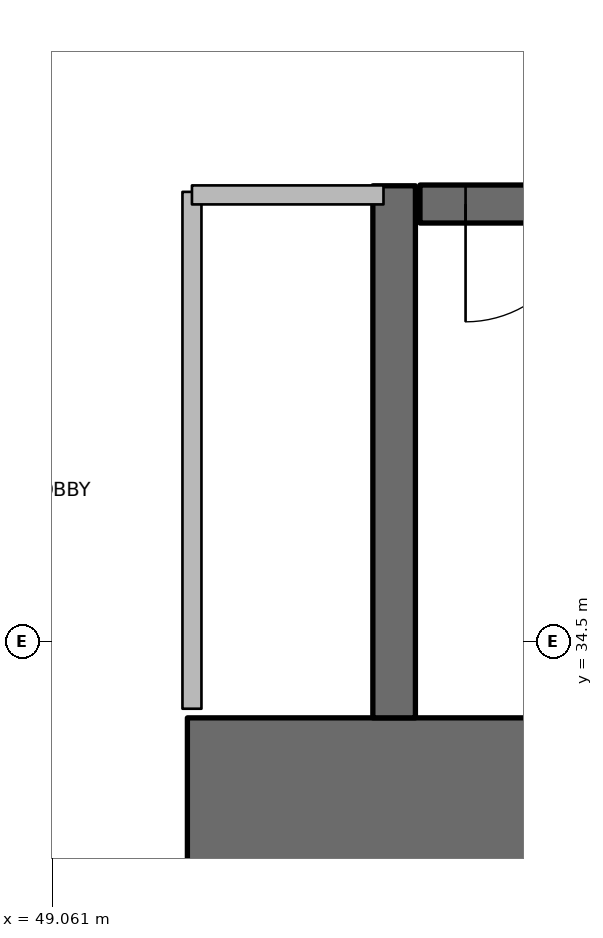
"""IFC4 building model, lengths in metres.
Left out: names, types, materials, properties, quantities, classifications, styles, units other than length and angle.
Written with IfcOpenShell. Run it as: python <this file> out.ifc"""

import sys

from ifc_helpers import new_model, si_unit, direction, frame, frame_2d, origin, place, context, subcontext, project, spatial, rectangle, extrude, element, fill, save


model = new_model("IFC4")
c1 = context("Model", 3, precision=1e-05, world=origin(), true_north=direction((0.0, 1.0)))
c2 = subcontext(c1, "Body", "Model", "MODEL_VIEW")
j1 = project(units=[si_unit("LENGTHUNIT", "METRE"), si_unit("PLANEANGLEUNIT", "RADIAN")], contexts=[c1])
p1 = place(None, origin())
s1 = spatial("IfcSite", under=j1, at=p1, CompositionType="ELEMENT")
p2 = place(p1, origin())
s2 = spatial("IfcBuilding", under=s1, at=p2, CompositionType="ELEMENT")
p3 = place(p2, frame((0.0, 0.0, 26.4)))
s3 = spatial("IfcBuildingStorey", under=s2, at=p3, CompositionType="ELEMENT", Elevation=26.4)
p4 = place(p3, frame((49.95, 33.525, 0.0), z_axis=(0.0, 0.0, 1.0), x_axis=(1.0, 0.0, 0.0)))
e1 = element("IfcWall", 1, at=p4, inside=s3, PredefinedType="SHEAR", context=c2, shape_type="SweptSolid", body=[
    extrude(rectangle(XDim=10.05, YDim=0.95, at=frame_2d((5.025, 0.0))), origin(), (0.0, 0.0, 1.0), 3.75),
])
p5 = place(p3, frame((51.31, 34.0, 0.0), z_axis=(0.0, 0.0, 1.0), x_axis=(0.0, 1.0, 0.0)))
e2 = element("IfcWall", 2, at=p5, inside=s3, PredefinedType="SHEAR", context=c2, shape_type="SweptSolid", body=[
    extrude(rectangle(XDim=3.5, YDim=0.28, at=frame_2d((1.75, 0.0))), origin(), (0.0, 0.0, 1.0), 3.75),
])
p6 = place(p3, frame((51.48, 37.38, 0.0), z_axis=(0.0, 0.0, 1.0), x_axis=(1.0, 0.0, 0.0)))
e3 = element("IfcWall", 3, at=p6, inside=s3, PredefinedType="SOLIDWALL", context=c2, shape_type="SweptSolid", body=[
    extrude(rectangle(XDim=7.54, YDim=0.25, at=frame_2d((3.77, 0.0))), origin(), (0.0, 0.0, 1.0), 3.5),
])
p7 = place(p6, frame((0.3, 0.0, 0.0)))
e4 = element("IfcOpeningElement", 4, at=p7, cuts=e3, PredefinedType="OPENING", context=c2, shape_type="SweptSolid", body=[
    extrude(rectangle(XDim=1.55, YDim=2.15, at=frame_2d((0.775, 1.075))), frame((0.0, 0.135, 0.0), z_axis=(0.0, -1.0, 0.0), x_axis=(1.0, 0.0, 0.0)), (0.0, 0.0, 1.0), 0.27),
])
p8 = place(p3, frame((49.98, 34.06, 0.0), z_axis=(0.0, 0.0, 1.0), x_axis=(0.0, 1.0, 0.0)))
e5 = element("IfcWall", 5, at=p8, inside=s3, PredefinedType="PARTITIONING", context=c2, shape_type="SweptSolid", body=[
    extrude(rectangle(XDim=3.4, YDim=0.125, at=frame_2d((1.7, 0.0))), origin(), (0.0, 0.0, 1.0), 2.94),
])
p9 = place(p3, frame((49.98, 37.44, 0.0), z_axis=(0.0, 0.0, 1.0), x_axis=(1.0, 0.0, 0.0)))
e6 = element("IfcWall", 6, at=p9, inside=s3, PredefinedType="PARTITIONING", context=c2, shape_type="SweptSolid", body=[
    extrude(rectangle(XDim=1.26, YDim=0.125, at=frame_2d((0.63, 0.0))), origin(), (0.0, 0.0, 1.0), 2.94),
])
p10 = place(p7, origin())
e7 = element("IfcDoor", 7, at=p10, inside=s3, OperationType="DOUBLE_DOOR_SINGLE_SWING", PredefinedType="DOOR", context=c2, shape_type="SweptSolid", body=[
    extrude(rectangle(XDim=1.55, YDim=2.15, at=frame_2d((0.775, 1.075))), frame((0.0, 0.025, 0.0), z_axis=(0.0, -1.0, 0.0), x_axis=(1.0, 0.0, 0.0)), (0.0, 0.0, 1.0), 0.05),
])
fill(e4, e7)
save(model, sys.argv[1])
